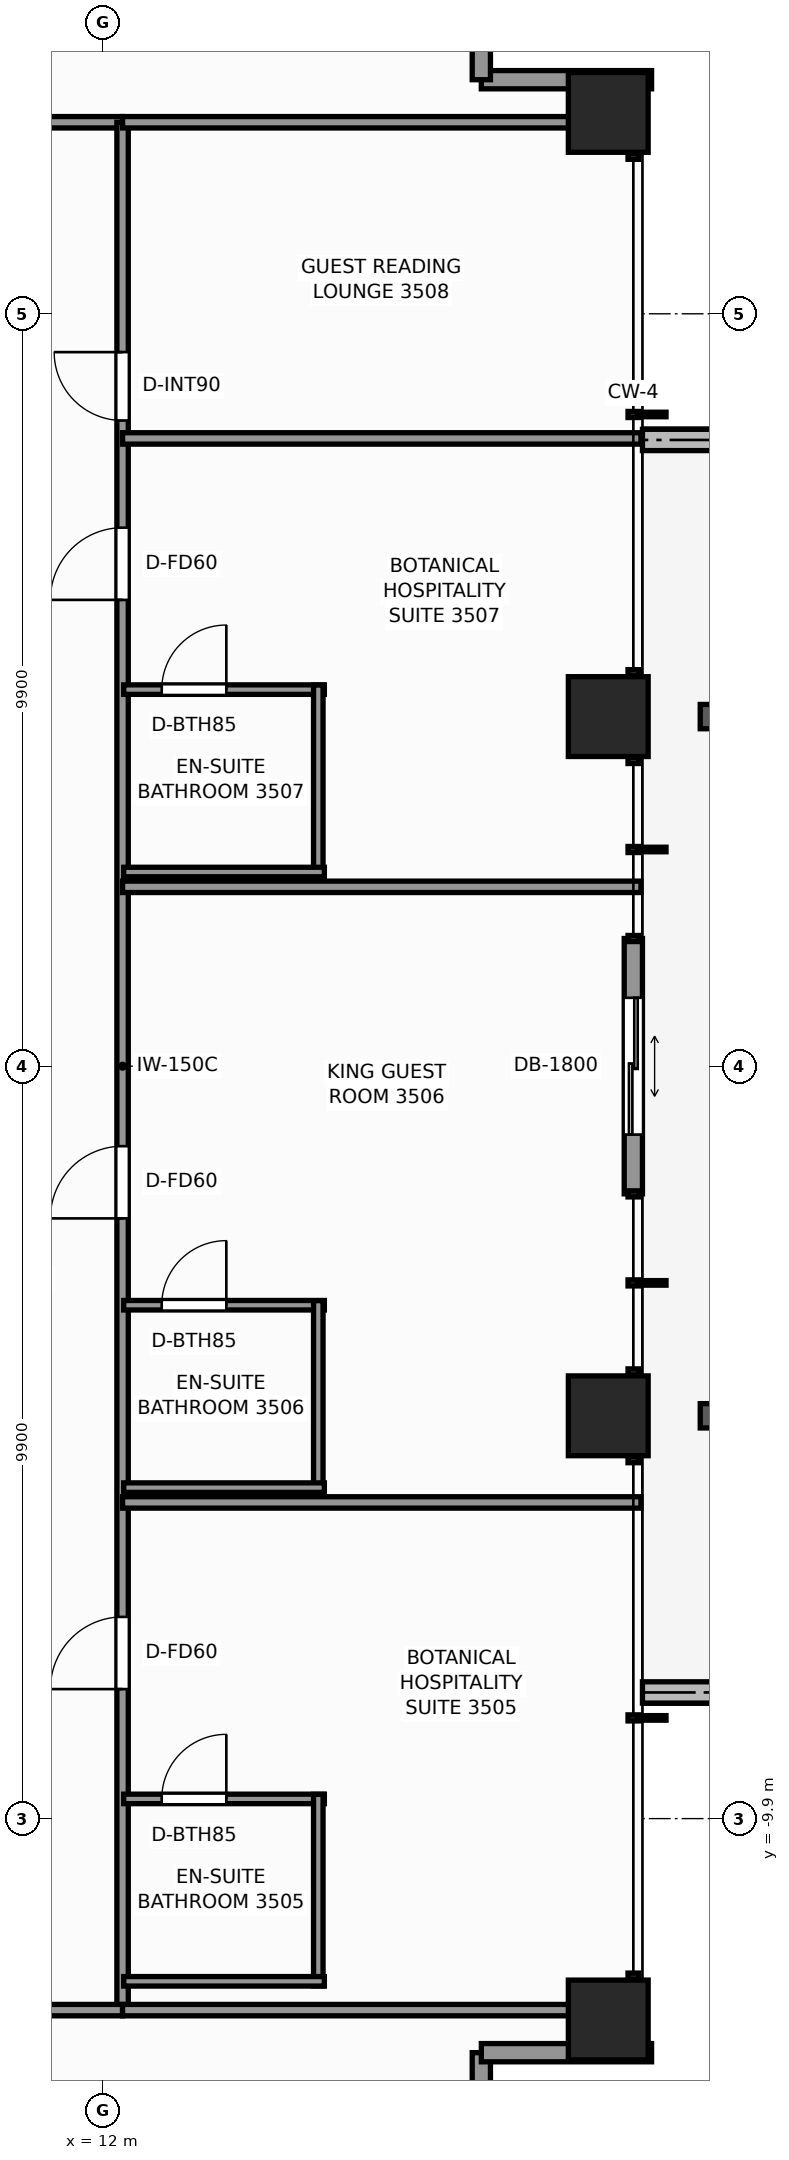
"""IFC4 building model, lengths in metres.
Left out: names, types, materials, properties, quantities, classifications, styles, units other than length and angle.
Written with IfcOpenShell. Run it as: python <this file> out.ifc"""

import sys

from ifc_helpers import new_model, si_unit, direction, frame, frame_2d, origin, origin_2d, place, context, subcontext, project, spatial, rectangle, extrude, element, fill, save


model = new_model("IFC4")
c1 = context("Model", 3, precision=1e-05, world=origin(), true_north=direction((0.0, 1.0)))
c2 = subcontext(c1, "Body", "Model", "MODEL_VIEW")
j1 = project(units=[si_unit("LENGTHUNIT", "METRE"), si_unit("PLANEANGLEUNIT", "RADIAN")], contexts=[c1])
p1 = place(None, origin())
s1 = spatial("IfcSite", under=j1, at=p1, CompositionType="ELEMENT")
p2 = place(p1, origin())
s2 = spatial("IfcBuilding", under=s1, at=p2, CompositionType="ELEMENT")
p3 = place(p2, frame((0.0, 0.0, 121.7)))
s3 = spatial("IfcBuildingStorey", under=s2, at=p3, CompositionType="ELEMENT", Elevation=121.7)
for number, where, z_axis, x_axis in (
    (1, (18.65, -12.55, 0.0), (0.0, 0.0, 1.0), (1.0, 0.0, 0.0)),
    (2, (18.65, -4.6, 0.0), (0.0, 0.0, 1.0), (1.0, 0.0, 0.0)),
    (3, (18.65, 4.6, 0.0), (0.0, 0.0, 1.0), (1.0, 0.0, 0.0)),
    (4, (18.65, 12.55, 0.0), (0.0, 0.0, 1.0), (1.0, 0.0, 0.0)),
):
    element("IfcColumn", number, at=place(p3, frame(where, z_axis=z_axis, x_axis=x_axis)), inside=s3, PredefinedType="COLUMN", context=c2, shape_type="SweptSolid", body=[
        extrude(rectangle(XDim=1.05, YDim=1.05, at=origin_2d()), origin(), (0.0, 0.0, 1.0), 3.3),
    ])
p4 = place(p3, frame((22.467, 8.24, -0.04), z_axis=(0.0, 0.0, 1.0), x_axis=(-1.0, 0.0, 0.0)))
e5 = element("IfcWall", 5, at=p4, inside=s3, PredefinedType="PARAPET", context=c2, shape_type="SweptSolid", body=[
    extrude(rectangle(XDim=3.367, YDim=0.28, at=frame_2d((1.684, 0.0))), origin(), (0.0, 0.0, 1.0), 0.42),
])
p5 = place(p3, frame((19.1, -8.24, -0.04), z_axis=(0.0, 0.0, 1.0), x_axis=(1.0, 0.0, 0.0)))
e6 = element("IfcWall", 6, at=p5, inside=s3, PredefinedType="PARAPET", context=c2, shape_type="SweptSolid", body=[
    extrude(rectangle(XDim=2.34, YDim=0.28, at=frame_2d((1.17, 0.0))), origin(), (0.0, 0.0, 1.0), 0.42),
])
p6 = place(p3, frame((16.98, -12.98, 0.0), z_axis=(0.0, 0.0, 1.0), x_axis=(0.0, -1.0, 0.0)))
e7 = element("IfcWall", 7, at=p6, inside=s3, PredefinedType="STANDARD", context=c2, shape_type="SweptSolid", body=[
    extrude(rectangle(XDim=2.24, YDim=0.24, at=frame_2d((1.12, 0.0))), origin(), (0.0, 0.0, 1.0), 2.459),
])
p7 = place(p6, frame((0.45, 0.0, 0.65)))
e8 = element("IfcOpeningElement", 8, at=p7, cuts=e7, PredefinedType="OPENING", context=c2, shape_type="SweptSolid", body=[
    extrude(rectangle(XDim=1.1, YDim=1.45, at=frame_2d((0.55, 0.725))), frame((0.0, 0.13, 0.0), z_axis=(0.0, -1.0, 0.0), x_axis=(1.0, 0.0, 0.0)), (0.0, 0.0, 1.0), 0.26),
])
p8 = place(p3, frame((19.22, -12.98, 0.0), z_axis=(0.0, 0.0, 1.0), x_axis=(-1.0, 0.0, 0.0)))
e9 = element("IfcWall", 9, at=p8, inside=s3, PredefinedType="STANDARD", context=c2, shape_type="SweptSolid", body=[
    extrude(rectangle(XDim=2.24, YDim=0.24, at=frame_2d((1.12, 0.0))), origin(), (0.0, 0.0, 1.0), 2.459),
])
p9 = place(p3, frame((18.98, 1.68, 0.0), z_axis=(0.0, 0.0, 1.0), x_axis=(0.0, -1.0, 0.0)))
e10 = element("IfcWall", 10, at=p9, inside=s3, PredefinedType="STANDARD", context=c2, shape_type="SweptSolid", body=[
    extrude(rectangle(XDim=3.36, YDim=0.24, at=frame_2d((1.68, 0.0))), origin(), (0.0, 0.0, 1.0), 3.08),
])
p10 = place(p9, frame((0.78, 0.0, 0.0)))
e11 = element("IfcOpeningElement", 11, at=p10, cuts=e10, PredefinedType="OPENING", context=c2, shape_type="SweptSolid", body=[
    extrude(rectangle(XDim=1.8, YDim=2.2, at=frame_2d((0.9, 1.1))), frame((0.0, 0.13, 0.0), z_axis=(0.0, -1.0, 0.0), x_axis=(1.0, 0.0, 0.0)), (0.0, 0.0, 1.0), 0.26),
])
p11 = place(p3, frame((16.98, 12.98, 0.0), z_axis=(0.0, 0.0, 1.0), x_axis=(1.0, 0.0, 0.0)))
e12 = element("IfcWall", 12, at=p11, inside=s3, PredefinedType="STANDARD", context=c2, shape_type="SweptSolid", body=[
    extrude(rectangle(XDim=2.24, YDim=0.24, at=frame_2d((1.12, 0.0))), origin(), (0.0, 0.0, 1.0), 2.459),
])
p12 = place(p3, frame((16.98, 15.22, 0.0), z_axis=(0.0, 0.0, 1.0), x_axis=(0.0, -1.0, 0.0)))
e13 = element("IfcWall", 13, at=p12, inside=s3, PredefinedType="STANDARD", context=c2, shape_type="SweptSolid", body=[
    extrude(rectangle(XDim=2.24, YDim=0.24, at=frame_2d((1.12, 0.0))), origin(), (0.0, 0.0, 1.0), 2.459),
])
p13 = place(p12, frame((0.45, 0.0, 0.65)))
e14 = element("IfcOpeningElement", 14, at=p13, cuts=e13, PredefinedType="OPENING", context=c2, shape_type="SweptSolid", body=[
    extrude(rectangle(XDim=1.1, YDim=1.45, at=frame_2d((0.55, 0.725))), frame((0.0, 0.13, 0.0), z_axis=(0.0, -1.0, 0.0), x_axis=(1.0, 0.0, 0.0)), (0.0, 0.0, 1.0), 0.26),
])
p14 = place(p3, frame((-12.58, 12.42, 0.0), z_axis=(0.0, 0.0, 1.0), x_axis=(1.0, 0.0, 0.0)))
e15 = element("IfcWall", 15, at=p14, inside=s3, PredefinedType="PARTITIONING", context=c2, shape_type="SweptSolid", body=[
    extrude(rectangle(XDim=24.84, YDim=0.15, at=frame_2d((12.42, 0.0))), origin(), (0.0, 0.0, 1.0), 2.292),
])
p15 = place(p14, frame((3.104, 0.0, 0.0)))
e16 = element("IfcOpeningElement", 16, at=p15, cuts=e15, PredefinedType="OPENING", context=c2, shape_type="SweptSolid", body=[
    extrude(rectangle(XDim=0.9, YDim=2.06, at=frame_2d((0.45, 1.03))), frame((0.0, 0.085, 0.0), z_axis=(0.0, -1.0, 0.0), x_axis=(1.0, 0.0, 0.0)), (0.0, 0.0, 1.0), 0.17),
])
p16 = place(p14, frame((5.439, 0.0, 0.0)))
e17 = element("IfcOpeningElement", 17, at=p16, cuts=e15, PredefinedType="OPENING", context=c2, shape_type="SweptSolid", body=[
    extrude(rectangle(XDim=0.9, YDim=2.06, at=frame_2d((0.45, 1.03))), frame((0.0, 0.085, 0.0), z_axis=(0.0, -1.0, 0.0), x_axis=(1.0, 0.0, 0.0)), (0.0, 0.0, 1.0), 0.17),
])
p17 = place(p14, frame((10.728, 0.0, 0.0)))
e18 = element("IfcOpeningElement", 18, at=p17, cuts=e15, PredefinedType="OPENING", context=c2, shape_type="SweptSolid", body=[
    extrude(rectangle(XDim=0.9, YDim=2.06, at=frame_2d((0.45, 1.03))), frame((0.0, 0.085, 0.0), z_axis=(0.0, -1.0, 0.0), x_axis=(1.0, 0.0, 0.0)), (0.0, 0.0, 1.0), 0.17),
])
p18 = place(p14, frame((13.906, 0.0, 0.0)))
e19 = element("IfcOpeningElement", 19, at=p18, cuts=e15, PredefinedType="OPENING", context=c2, shape_type="SweptSolid", body=[
    extrude(rectangle(XDim=0.95, YDim=2.06, at=frame_2d((0.475, 1.03))), frame((0.0, 0.085, 0.0), z_axis=(0.0, -1.0, 0.0), x_axis=(1.0, 0.0, 0.0)), (0.0, 0.0, 1.0), 0.17),
])
p19 = place(p14, frame((18.661, 0.0, 0.0)))
e20 = element("IfcOpeningElement", 20, at=p19, cuts=e15, PredefinedType="OPENING", context=c2, shape_type="SweptSolid", body=[
    extrude(rectangle(XDim=0.9, YDim=2.06, at=frame_2d((0.45, 1.03))), frame((0.0, 0.085, 0.0), z_axis=(0.0, -1.0, 0.0), x_axis=(1.0, 0.0, 0.0)), (0.0, 0.0, 1.0), 0.17),
])
p20 = place(p14, frame((20.996, 0.0, 0.0)))
e21 = element("IfcOpeningElement", 21, at=p20, cuts=e15, PredefinedType="OPENING", context=c2, shape_type="SweptSolid", body=[
    extrude(rectangle(XDim=0.9, YDim=2.06, at=frame_2d((0.45, 1.03))), frame((0.0, 0.085, 0.0), z_axis=(0.0, -1.0, 0.0), x_axis=(1.0, 0.0, 0.0)), (0.0, 0.0, 1.0), 0.17),
])
p21 = place(p3, frame((12.26, -12.42, 0.0), z_axis=(0.0, 0.0, 1.0), x_axis=(0.0, 1.0, 0.0)))
e22 = element("IfcWall", 22, at=p21, inside=s3, PredefinedType="PARTITIONING", context=c2, shape_type="SweptSolid", body=[
    extrude(rectangle(XDim=24.84, YDim=0.15, at=frame_2d((12.42, 0.0))), origin(), (0.0, 0.0, 1.0), 2.292),
])
p22 = place(p21, frame((4.224, 0.0, 0.0)))
e23 = element("IfcOpeningElement", 23, at=p22, cuts=e22, PredefinedType="OPENING", context=c2, shape_type="SweptSolid", body=[
    extrude(rectangle(XDim=0.95, YDim=2.06, at=frame_2d((0.475, 1.03))), frame((0.0, 0.085, 0.0), z_axis=(0.0, -1.0, 0.0), x_axis=(1.0, 0.0, 0.0)), (0.0, 0.0, 1.0), 0.17),
])
p23 = place(p21, frame((10.417, 0.0, 0.0)))
e24 = element("IfcOpeningElement", 24, at=p23, cuts=e22, PredefinedType="OPENING", context=c2, shape_type="SweptSolid", body=[
    extrude(rectangle(XDim=0.95, YDim=2.06, at=frame_2d((0.475, 1.03))), frame((0.0, 0.085, 0.0), z_axis=(0.0, -1.0, 0.0), x_axis=(1.0, 0.0, 0.0)), (0.0, 0.0, 1.0), 0.17),
])
p24 = place(p21, frame((18.556, 0.0, 0.0)))
e25 = element("IfcOpeningElement", 25, at=p24, cuts=e22, PredefinedType="OPENING", context=c2, shape_type="SweptSolid", body=[
    extrude(rectangle(XDim=0.95, YDim=2.06, at=frame_2d((0.475, 1.03))), frame((0.0, 0.085, 0.0), z_axis=(0.0, -1.0, 0.0), x_axis=(1.0, 0.0, 0.0)), (0.0, 0.0, 1.0), 0.17),
])
p25 = place(p21, frame((20.916, 0.0, 0.0)))
e26 = element("IfcOpeningElement", 26, at=p25, cuts=e22, PredefinedType="OPENING", context=c2, shape_type="SweptSolid", body=[
    extrude(rectangle(XDim=0.9, YDim=2.06, at=frame_2d((0.45, 1.03))), frame((0.0, 0.085, 0.0), z_axis=(0.0, -1.0, 0.0), x_axis=(1.0, 0.0, 0.0)), (0.0, 0.0, 1.0), 0.17),
])
p26 = place(p3, frame((-3.65, -12.42, 0.0), z_axis=(0.0, 0.0, 1.0), x_axis=(1.0, 0.0, 0.0)))
e27 = element("IfcWall", 27, at=p26, inside=s3, PredefinedType="PARTITIONING", context=c2, shape_type="SweptSolid", body=[
    extrude(rectangle(XDim=15.91, YDim=0.15, at=frame_2d((7.955, 0.0))), origin(), (0.0, 0.0, 1.0), 2.292),
])
p27 = place(p26, frame((5.205, 0.0, 0.0)))
e28 = element("IfcOpeningElement", 28, at=p27, cuts=e27, PredefinedType="OPENING", context=c2, shape_type="SweptSolid", body=[
    extrude(rectangle(XDim=0.95, YDim=2.06, at=frame_2d((0.475, 1.03))), frame((0.0, 0.085, 0.0), z_axis=(0.0, -1.0, 0.0), x_axis=(1.0, 0.0, 0.0)), (0.0, 0.0, 1.0), 0.17),
])
p28 = place(p26, frame((12.052, 0.0, 0.0)))
e29 = element("IfcOpeningElement", 29, at=p28, cuts=e27, PredefinedType="OPENING", context=c2, shape_type="SweptSolid", body=[
    extrude(rectangle(XDim=0.95, YDim=2.06, at=frame_2d((0.475, 1.03))), frame((0.0, 0.085, 0.0), z_axis=(0.0, -1.0, 0.0), x_axis=(1.0, 0.0, 0.0)), (0.0, 0.0, 1.0), 0.17),
])
for number, where, z_axis, x_axis in (
    (30, (12.26, -12.42, 0.0), (0.0, 0.0, 1.0), (1.0, 0.0, 0.0)),
    (31, (12.26, 12.42, 0.0), (0.0, 0.0, 1.0), (1.0, 0.0, 0.0)),
):
    element("IfcWall", number, at=place(p3, frame(where, z_axis=z_axis, x_axis=x_axis)), inside=s3, PredefinedType="PARTITIONING", context=c2, shape_type="SweptSolid", body=[
        extrude(rectangle(XDim=6.82, YDim=0.15, at=frame_2d((3.41, 0.0))), origin(), (0.0, 0.0, 1.0), 2.292),
    ])
p29 = place(p3, frame((12.26, -5.74, 0.0), z_axis=(0.0, 0.0, 1.0), x_axis=(1.0, 0.0, 0.0)))
e32 = element("IfcWall", 32, at=p29, inside=s3, PredefinedType="PARTITIONING", context=c2, shape_type="SweptSolid", body=[
    extrude(rectangle(XDim=6.82, YDim=0.15, at=frame_2d((3.41, 0.0))), origin(), (0.0, 0.0, 1.0), 2.449),
])
p30 = place(p3, frame((12.275, -9.641, 0.0), z_axis=(0.0, 0.0, 1.0), x_axis=(1.0, 0.0, 0.0)))
e33 = element("IfcWall", 33, at=p30, inside=s3, PredefinedType="PARTITIONING", context=c2, shape_type="SweptSolid", body=[
    extrude(rectangle(XDim=2.64, YDim=0.125, at=frame_2d((1.32, 0.0))), origin(), (0.0, 0.0, 1.0), 3.08),
])
p31 = place(p30, frame((0.5, 0.0, 0.0)))
e34 = element("IfcOpeningElement", 34, at=p31, cuts=e33, PredefinedType="OPENING", context=c2, shape_type="SweptSolid", body=[
    extrude(rectangle(XDim=0.85, YDim=2.03, at=frame_2d((0.425, 1.015))), frame((0.0, 0.073, 0.0), z_axis=(0.0, -1.0, 0.0), x_axis=(1.0, 0.0, 0.0)), (0.0, 0.0, 1.0), 0.145),
])
p32 = place(p3, frame((14.835, -12.101, 0.0), z_axis=(0.0, 0.0, 1.0), x_axis=(0.0, 1.0, 0.0)))
e35 = element("IfcWall", 35, at=p32, inside=s3, PredefinedType="PARTITIONING", context=c2, shape_type="SweptSolid", body=[
    extrude(rectangle(XDim=2.52, YDim=0.125, at=frame_2d((1.26, 0.0))), origin(), (0.0, 0.0, 1.0), 2.292),
])
p33 = place(p3, frame((12.275, -12.041, 0.0), z_axis=(0.0, 0.0, 1.0), x_axis=(1.0, 0.0, 0.0)))
e36 = element("IfcWall", 36, at=p33, inside=s3, PredefinedType="PARTITIONING", context=c2, shape_type="SweptSolid", body=[
    extrude(rectangle(XDim=2.64, YDim=0.125, at=frame_2d((1.32, 0.0))), origin(), (0.0, 0.0, 1.0), 3.08),
])
p34 = place(p3, frame((12.26, 2.36, 0.0), z_axis=(0.0, 0.0, 1.0), x_axis=(1.0, 0.0, 0.0)))
e37 = element("IfcWall", 37, at=p34, inside=s3, PredefinedType="PARTITIONING", context=c2, shape_type="SweptSolid", body=[
    extrude(rectangle(XDim=6.82, YDim=0.15, at=frame_2d((3.41, 0.0))), origin(), (0.0, 0.0, 1.0), 2.449),
])
p35 = place(p3, frame((12.275, -3.145, 0.0), z_axis=(0.0, 0.0, 1.0), x_axis=(1.0, 0.0, 0.0)))
e38 = element("IfcWall", 38, at=p35, inside=s3, PredefinedType="PARTITIONING", context=c2, shape_type="SweptSolid", body=[
    extrude(rectangle(XDim=2.64, YDim=0.125, at=frame_2d((1.32, 0.0))), origin(), (0.0, 0.0, 1.0), 3.08),
])
p36 = place(p35, frame((0.5, 0.0, 0.0)))
e39 = element("IfcOpeningElement", 39, at=p36, cuts=e38, PredefinedType="OPENING", context=c2, shape_type="SweptSolid", body=[
    extrude(rectangle(XDim=0.85, YDim=2.03, at=frame_2d((0.425, 1.015))), frame((0.0, 0.073, 0.0), z_axis=(0.0, -1.0, 0.0), x_axis=(1.0, 0.0, 0.0)), (0.0, 0.0, 1.0), 0.145),
])
p37 = place(p3, frame((14.835, -5.605, 0.0), z_axis=(0.0, 0.0, 1.0), x_axis=(0.0, 1.0, 0.0)))
e40 = element("IfcWall", 40, at=p37, inside=s3, PredefinedType="PARTITIONING", context=c2, shape_type="SweptSolid", body=[
    extrude(rectangle(XDim=2.52, YDim=0.125, at=frame_2d((1.26, 0.0))), origin(), (0.0, 0.0, 1.0), 2.292),
])
p38 = place(p3, frame((12.275, -5.545, 0.0), z_axis=(0.0, 0.0, 1.0), x_axis=(1.0, 0.0, 0.0)))
e41 = element("IfcWall", 41, at=p38, inside=s3, PredefinedType="PARTITIONING", context=c2, shape_type="SweptSolid", body=[
    extrude(rectangle(XDim=2.64, YDim=0.125, at=frame_2d((1.32, 0.0))), origin(), (0.0, 0.0, 1.0), 3.08),
])
p39 = place(p3, frame((12.26, 8.26, 0.0), z_axis=(0.0, 0.0, 1.0), x_axis=(1.0, 0.0, 0.0)))
e42 = element("IfcWall", 42, at=p39, inside=s3, PredefinedType="PARTITIONING", context=c2, shape_type="SweptSolid", body=[
    extrude(rectangle(XDim=6.82, YDim=0.15, at=frame_2d((3.41, 0.0))), origin(), (0.0, 0.0, 1.0), 2.449),
])
p40 = place(p3, frame((12.275, 4.955, 0.0), z_axis=(0.0, 0.0, 1.0), x_axis=(1.0, 0.0, 0.0)))
e43 = element("IfcWall", 43, at=p40, inside=s3, PredefinedType="PARTITIONING", context=c2, shape_type="SweptSolid", body=[
    extrude(rectangle(XDim=2.64, YDim=0.125, at=frame_2d((1.32, 0.0))), origin(), (0.0, 0.0, 1.0), 3.08),
])
p41 = place(p40, frame((0.5, 0.0, 0.0)))
e44 = element("IfcOpeningElement", 44, at=p41, cuts=e43, PredefinedType="OPENING", context=c2, shape_type="SweptSolid", body=[
    extrude(rectangle(XDim=0.85, YDim=2.03, at=frame_2d((0.425, 1.015))), frame((0.0, 0.073, 0.0), z_axis=(0.0, -1.0, 0.0), x_axis=(1.0, 0.0, 0.0)), (0.0, 0.0, 1.0), 0.145),
])
p42 = place(p3, frame((14.835, 2.495, 0.0), z_axis=(0.0, 0.0, 1.0), x_axis=(0.0, 1.0, 0.0)))
e45 = element("IfcWall", 45, at=p42, inside=s3, PredefinedType="PARTITIONING", context=c2, shape_type="SweptSolid", body=[
    extrude(rectangle(XDim=2.52, YDim=0.125, at=frame_2d((1.26, 0.0))), origin(), (0.0, 0.0, 1.0), 2.292),
])
p43 = place(p3, frame((12.275, 2.555, 0.0), z_axis=(0.0, 0.0, 1.0), x_axis=(1.0, 0.0, 0.0)))
e46 = element("IfcWall", 46, at=p43, inside=s3, PredefinedType="PARTITIONING", context=c2, shape_type="SweptSolid", body=[
    extrude(rectangle(XDim=2.64, YDim=0.125, at=frame_2d((1.32, 0.0))), origin(), (0.0, 0.0, 1.0), 3.08),
])
p44 = place(p10, origin())
e47 = element("IfcDoor", 47, at=p44, inside=s3, OperationType="DOUBLE_DOOR_SLIDING", PredefinedType="DOOR", context=c2, shape_type="SweptSolid", body=[
    extrude(rectangle(XDim=1.8, YDim=2.2, at=frame_2d((0.9, 1.1))), frame((0.0, 0.025, 0.0), z_axis=(0.0, -1.0, 0.0), x_axis=(1.0, 0.0, 0.0)), (0.0, 0.0, 1.0), 0.05),
])
fill(e11, e47)
p45 = place(p31, origin())
e48 = element("IfcDoor", 48, at=p45, inside=s3, OperationType="SINGLE_SWING_RIGHT", PredefinedType="DOOR", context=c2, shape_type="SweptSolid", body=[
    extrude(rectangle(XDim=0.85, YDim=2.03, at=frame_2d((0.425, 1.015))), frame((0.0, 0.025, 0.0), z_axis=(0.0, -1.0, 0.0), x_axis=(1.0, 0.0, 0.0)), (0.0, 0.0, 1.0), 0.05),
])
fill(e34, e48)
p46 = place(p22, origin())
e49 = element("IfcDoor", 49, at=p46, inside=s3, OperationType="SINGLE_SWING_LEFT", PredefinedType="DOOR", context=c2, shape_type="SweptSolid", body=[
    extrude(rectangle(XDim=0.95, YDim=2.06, at=frame_2d((0.475, 1.03))), frame((0.0, 0.025, 0.0), z_axis=(0.0, -1.0, 0.0), x_axis=(1.0, 0.0, 0.0)), (0.0, 0.0, 1.0), 0.05),
])
fill(e23, e49)
p47 = place(p36, origin())
e50 = element("IfcDoor", 50, at=p47, inside=s3, OperationType="SINGLE_SWING_RIGHT", PredefinedType="DOOR", context=c2, shape_type="SweptSolid", body=[
    extrude(rectangle(XDim=0.85, YDim=2.03, at=frame_2d((0.425, 1.015))), frame((0.0, 0.025, 0.0), z_axis=(0.0, -1.0, 0.0), x_axis=(1.0, 0.0, 0.0)), (0.0, 0.0, 1.0), 0.05),
])
fill(e39, e50)
p48 = place(p23, origin())
e51 = element("IfcDoor", 51, at=p48, inside=s3, OperationType="SINGLE_SWING_LEFT", PredefinedType="DOOR", context=c2, shape_type="SweptSolid", body=[
    extrude(rectangle(XDim=0.95, YDim=2.06, at=frame_2d((0.475, 1.03))), frame((0.0, 0.025, 0.0), z_axis=(0.0, -1.0, 0.0), x_axis=(1.0, 0.0, 0.0)), (0.0, 0.0, 1.0), 0.05),
])
fill(e24, e51)
p49 = place(p41, origin())
e52 = element("IfcDoor", 52, at=p49, inside=s3, OperationType="SINGLE_SWING_RIGHT", PredefinedType="DOOR", context=c2, shape_type="SweptSolid", body=[
    extrude(rectangle(XDim=0.85, YDim=2.03, at=frame_2d((0.425, 1.015))), frame((0.0, 0.025, 0.0), z_axis=(0.0, -1.0, 0.0), x_axis=(1.0, 0.0, 0.0)), (0.0, 0.0, 1.0), 0.05),
])
fill(e44, e52)
p50 = place(p24, origin())
e53 = element("IfcDoor", 53, at=p50, inside=s3, OperationType="SINGLE_SWING_LEFT", PredefinedType="DOOR", context=c2, shape_type="SweptSolid", body=[
    extrude(rectangle(XDim=0.95, YDim=2.06, at=frame_2d((0.475, 1.03))), frame((0.0, 0.025, 0.0), z_axis=(0.0, -1.0, 0.0), x_axis=(1.0, 0.0, 0.0)), (0.0, 0.0, 1.0), 0.05),
])
fill(e25, e53)
p51 = place(p25, origin())
e54 = element("IfcDoor", 54, at=p51, inside=s3, OperationType="SINGLE_SWING_RIGHT", PredefinedType="DOOR", context=c2, shape_type="SweptSolid", body=[
    extrude(rectangle(XDim=0.9, YDim=2.06, at=frame_2d((0.45, 1.03))), frame((0.0, 0.025, 0.0), z_axis=(0.0, -1.0, 0.0), x_axis=(1.0, 0.0, 0.0)), (0.0, 0.0, 1.0), 0.05),
])
fill(e26, e54)
save(model, sys.argv[1])
